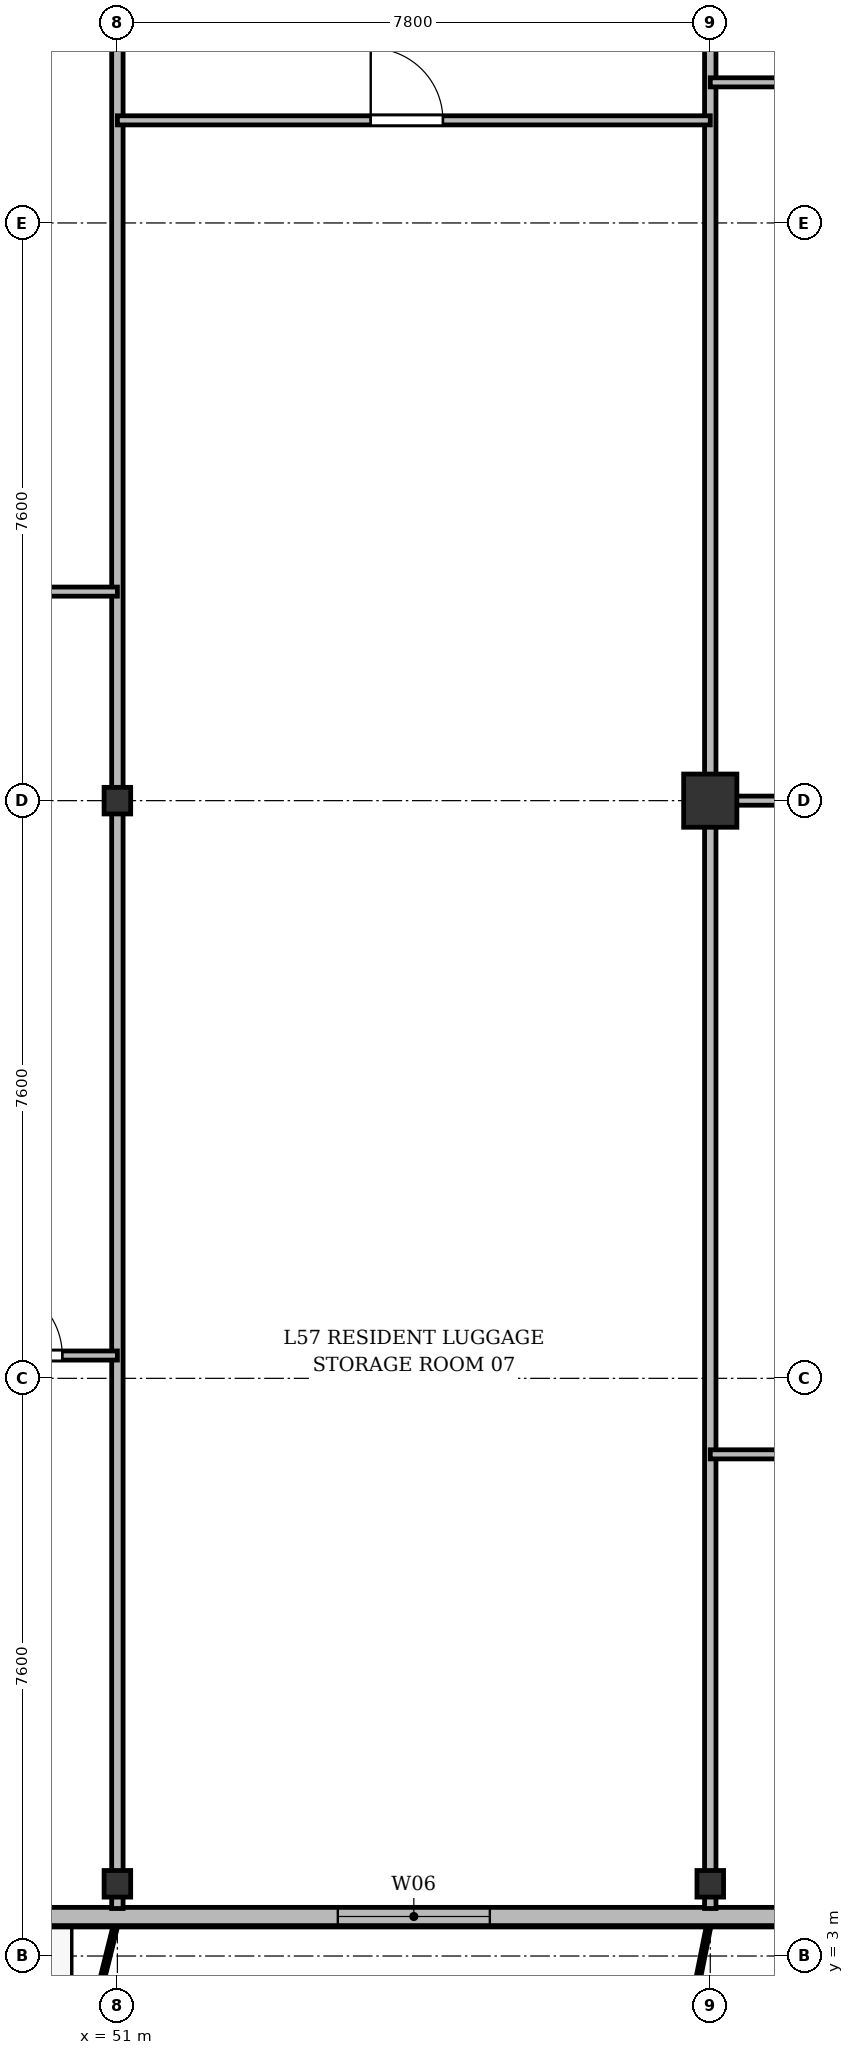
"""IFC4 building model, lengths in metres.
Left out: names, types, materials, properties, quantities, classifications, styles, units other than length and angle.
Written with IfcOpenShell. Run it as: python <this file> out.ifc"""

import sys

from ifc_helpers import new_model, si_unit, direction, frame, frame_2d, origin, origin_2d, place, context, subcontext, project, spatial, rectangle, i_section, extrude, source, transform, mapped, element, fill, save


model = new_model("IFC4")
c1 = context("Model", 3, precision=1e-05, world=origin(), true_north=direction((0.0, 1.0)))
c2 = subcontext(c1, "Body", "Model", "MODEL_VIEW")
j1 = project(units=[si_unit("LENGTHUNIT", "METRE"), si_unit("PLANEANGLEUNIT", "RADIAN")], contexts=[c1])
p1 = place(None, origin())
s1 = spatial("IfcSite", under=j1, at=p1, CompositionType="ELEMENT")
p2 = place(p1, origin())
s2 = spatial("IfcBuilding", under=s1, at=p2, CompositionType="ELEMENT")
p3 = place(p2, frame((0.0, 0.0, 219.3)))
s3 = spatial("IfcBuildingStorey", under=s2, at=p3, CompositionType="ELEMENT", Elevation=219.3)
m1 = source(origin(), c2, "Body", "SweptSolid", [
    extrude(i_section(OverallWidth=0.35, OverallDepth=0.35, WebThickness=0.018, FlangeThickness=0.028, at=origin_2d()), origin(), (0.0, 0.0, 1.0), 3.6),
])
for number, where, z_axis, x_axis in (
    (1, (51.0, 3.95, 0.0), (0.0, 0.0, 1.0), (1.0, 0.0, 0.0)),
    (2, (51.0, 18.2, 0.0), (0.0, 0.0, 1.0), (1.0, 0.0, 0.0)),
    (3, (58.8, 3.95, 0.0), (0.0, 0.0, 1.0), (1.0, 0.0, 0.0)),
):
    element("IfcColumn", number, at=place(p3, frame(where, z_axis=z_axis, x_axis=x_axis)), inside=s3, PredefinedType="COLUMN", context=c2, shape_type="MappedRepresentation", body=[
        mapped(m1, transform((0.0, 0.0, 0.0), x_axis=(1.0, 0.0, 0.0), y_axis=(0.0, 1.0, 0.0), z_axis=(0.0, 0.0, 1.0), scale=1.0)),
    ])
m2 = source(origin(), c2, "Body", "SweptSolid", [
    extrude(rectangle(XDim=0.7, YDim=0.7, at=origin_2d()), origin(), (0.0, 0.0, 1.0), 3.6),
])
p4 = place(p3, frame((58.8, 18.2, 0.0), z_axis=(0.0, 0.0, 1.0), x_axis=(1.0, 0.0, 0.0)))
e4 = element("IfcColumn", 4, at=p4, inside=s3, PredefinedType="COLUMN", context=c2, shape_type="MappedRepresentation", body=[
    mapped(m2, transform((0.0, 0.0, 0.0), x_axis=(1.0, 0.0, 0.0), y_axis=(0.0, 1.0, 0.0), z_axis=(0.0, 0.0, 1.0), scale=1.0)),
])
p5 = place(p3, frame((63.4, 3.52, 0.0), z_axis=(0.0, 0.0, 1.0), x_axis=(-1.0, 0.0, 0.0)))
e5 = element("IfcWall", 5, at=p5, inside=s3, PredefinedType="SOLIDWALL", context=c2, shape_type="SweptSolid", body=[
    extrude(rectangle(XDim=52.4, YDim=0.24, at=frame_2d((26.2, 0.0))), origin(), (0.0, 0.0, 1.0), 3.36),
])
p6 = place(p5, frame((1.595, 0.0, 0.9)))
e6 = element("IfcOpeningElement", 6, at=p6, cuts=e5, PredefinedType="OPENING", context=c2, shape_type="SweptSolid", body=[
    extrude(rectangle(XDim=1.5, YDim=1.75, at=frame_2d((0.75, 0.875))), frame((0.0, 0.13, 0.0), z_axis=(0.0, -1.0, 0.0), x_axis=(1.0, 0.0, 0.0)), (0.0, 0.0, 1.0), 0.26),
])
p7 = place(p5, frame((7.5, 0.0, 0.9)))
e7 = element("IfcOpeningElement", 7, at=p7, cuts=e5, PredefinedType="OPENING", context=c2, shape_type="SweptSolid", body=[
    extrude(rectangle(XDim=2.0, YDim=1.95, at=frame_2d((1.0, 0.975))), frame((0.0, 0.13, 0.0), z_axis=(0.0, -1.0, 0.0), x_axis=(1.0, 0.0, 0.0)), (0.0, 0.0, 1.0), 0.26),
])
p8 = place(p5, frame((13.42, 0.0, 0.0)))
e8 = element("IfcOpeningElement", 8, at=p8, cuts=e5, PredefinedType="OPENING", context=c2, shape_type="SweptSolid", body=[
    extrude(rectangle(XDim=1.2, YDim=2.2, at=frame_2d((0.6, 1.1))), frame((0.0, 0.13, 0.0), z_axis=(0.0, -1.0, 0.0), x_axis=(1.0, 0.0, 0.0)), (0.0, 0.0, 1.0), 0.26),
])
p9 = place(p5, frame((15.1, 0.0, 0.9)))
e9 = element("IfcOpeningElement", 9, at=p9, cuts=e5, PredefinedType="OPENING", context=c2, shape_type="SweptSolid", body=[
    extrude(rectangle(XDim=1.8, YDim=1.8, at=frame_2d((0.9, 0.9))), frame((0.0, 0.13, 0.0), z_axis=(0.0, -1.0, 0.0), x_axis=(1.0, 0.0, 0.0)), (0.0, 0.0, 1.0), 0.26),
])
p10 = place(p5, frame((17.65, 0.0, 0.9)))
e10 = element("IfcOpeningElement", 10, at=p10, cuts=e5, PredefinedType="OPENING", context=c2, shape_type="SweptSolid", body=[
    extrude(rectangle(XDim=1.5, YDim=1.75, at=frame_2d((0.75, 0.875))), frame((0.0, 0.13, 0.0), z_axis=(0.0, -1.0, 0.0), x_axis=(1.0, 0.0, 0.0)), (0.0, 0.0, 1.0), 0.26),
])
p11 = place(p5, frame((20.5, 0.0, 0.9)))
e11 = element("IfcOpeningElement", 11, at=p11, cuts=e5, PredefinedType="OPENING", context=c2, shape_type="SweptSolid", body=[
    extrude(rectangle(XDim=1.5, YDim=1.75, at=frame_2d((0.75, 0.875))), frame((0.0, 0.13, 0.0), z_axis=(0.0, -1.0, 0.0), x_axis=(1.0, 0.0, 0.0)), (0.0, 0.0, 1.0), 0.26),
])
p12 = place(p5, frame((23.55, 0.0, 0.9)))
e12 = element("IfcOpeningElement", 12, at=p12, cuts=e5, PredefinedType="OPENING", context=c2, shape_type="SweptSolid", body=[
    extrude(rectangle(XDim=2.0, YDim=1.95, at=frame_2d((1.0, 0.975))), frame((0.0, 0.13, 0.0), z_axis=(0.0, -1.0, 0.0), x_axis=(1.0, 0.0, 0.0)), (0.0, 0.0, 1.0), 0.26),
])
p13 = place(p5, frame((28.675, 0.0, 0.9)))
e13 = element("IfcOpeningElement", 13, at=p13, cuts=e5, PredefinedType="OPENING", context=c2, shape_type="SweptSolid", body=[
    extrude(rectangle(XDim=1.65, YDim=1.85, at=frame_2d((0.825, 0.925))), frame((0.0, 0.13, 0.0), z_axis=(0.0, -1.0, 0.0), x_axis=(1.0, 0.0, 0.0)), (0.0, 0.0, 1.0), 0.26),
])
p14 = place(p5, frame((33.7, 0.0, 0.9)))
e14 = element("IfcOpeningElement", 14, at=p14, cuts=e5, PredefinedType="OPENING", context=c2, shape_type="SweptSolid", body=[
    extrude(rectangle(XDim=1.8, YDim=1.8, at=frame_2d((0.9, 0.9))), frame((0.0, 0.13, 0.0), z_axis=(0.0, -1.0, 0.0), x_axis=(1.0, 0.0, 0.0)), (0.0, 0.0, 1.0), 0.26),
])
p15 = place(p5, frame((37.1, 0.0, 0.9)))
e15 = element("IfcOpeningElement", 15, at=p15, cuts=e5, PredefinedType="OPENING", context=c2, shape_type="SweptSolid", body=[
    extrude(rectangle(XDim=2.2, YDim=1.8, at=frame_2d((1.1, 0.9))), frame((0.0, 0.13, 0.0), z_axis=(0.0, -1.0, 0.0), x_axis=(1.0, 0.0, 0.0)), (0.0, 0.0, 1.0), 0.26),
])
p16 = place(p5, frame((41.09, 0.0, 0.0)))
e16 = element("IfcOpeningElement", 16, at=p16, cuts=e5, PredefinedType="OPENING", context=c2, shape_type="SweptSolid", body=[
    extrude(rectangle(XDim=1.2, YDim=2.2, at=frame_2d((0.6, 1.1))), frame((0.0, 0.13, 0.0), z_axis=(0.0, -1.0, 0.0), x_axis=(1.0, 0.0, 0.0)), (0.0, 0.0, 1.0), 0.26),
])
p17 = place(p5, frame((42.9, 0.0, 0.9)))
e17 = element("IfcOpeningElement", 17, at=p17, cuts=e5, PredefinedType="OPENING", context=c2, shape_type="SweptSolid", body=[
    extrude(rectangle(XDim=2.0, YDim=1.95, at=frame_2d((1.0, 0.975))), frame((0.0, 0.13, 0.0), z_axis=(0.0, -1.0, 0.0), x_axis=(1.0, 0.0, 0.0)), (0.0, 0.0, 1.0), 0.26),
])
p18 = place(p5, frame((45.675, 0.0, 0.9)))
e18 = element("IfcOpeningElement", 18, at=p18, cuts=e5, PredefinedType="OPENING", context=c2, shape_type="SweptSolid", body=[
    extrude(rectangle(XDim=1.65, YDim=1.85, at=frame_2d((0.825, 0.925))), frame((0.0, 0.13, 0.0), z_axis=(0.0, -1.0, 0.0), x_axis=(1.0, 0.0, 0.0)), (0.0, 0.0, 1.0), 0.26),
])
p19 = place(p5, frame((49.155, 0.0, 0.9)))
e19 = element("IfcOpeningElement", 19, at=p19, cuts=e5, PredefinedType="OPENING", context=c2, shape_type="SweptSolid", body=[
    extrude(rectangle(XDim=1.8, YDim=1.8, at=frame_2d((0.9, 0.9))), frame((0.0, 0.13, 0.0), z_axis=(0.0, -1.0, 0.0), x_axis=(1.0, 0.0, 0.0)), (0.0, 0.0, 1.0), 0.26),
])
for number, where, z_axis, x_axis in (
    (20, (51.0, 3.625, 0.0), (0.0, 0.0, 1.0), (0.0, 1.0, 0.0)),
    (21, (58.8, 3.625, 0.0), (0.0, 0.0, 1.0), (0.0, 1.0, 0.0)),
):
    element("IfcWall", number, at=place(p3, frame(where, z_axis=z_axis, x_axis=x_axis)), inside=s3, PredefinedType="PARTITIONING", context=c2, shape_type="SweptSolid", body=[
        extrude(rectangle(XDim=27.375, YDim=0.15, at=frame_2d((13.688, 0.0))), origin(), (0.0, 0.0, 1.0), 2.86),
    ])
p20 = place(p3, frame((43.8, 20.95, 0.0), z_axis=(0.0, 0.0, 1.0), x_axis=(1.0, 0.0, 0.0)))
e22 = element("IfcWall", 22, at=p20, inside=s3, PredefinedType="PARTITIONING", context=c2, shape_type="SweptSolid", body=[
    extrude(rectangle(XDim=7.2, YDim=0.12, at=frame_2d((3.6, 0.0))), origin(), (0.0, 0.0, 1.0), 2.86),
])
p21 = place(p20, frame((3.125, 0.0, 0.0)))
e23 = element("IfcOpeningElement", 23, at=p21, cuts=e22, PredefinedType="OPENING", context=c2, shape_type="SweptSolid", body=[
    extrude(rectangle(XDim=0.95, YDim=2.15, at=frame_2d((0.475, 1.075))), frame((0.0, 0.07, 0.0), z_axis=(0.0, -1.0, 0.0), x_axis=(1.0, 0.0, 0.0)), (0.0, 0.0, 1.0), 0.14),
])
p22 = place(p3, frame((48.6, 10.9, 0.0), z_axis=(0.0, 0.0, 1.0), x_axis=(1.0, 0.0, 0.0)))
e24 = element("IfcWall", 24, at=p22, inside=s3, PredefinedType="PARTITIONING", context=c2, shape_type="SweptSolid", body=[
    extrude(rectangle(XDim=2.4, YDim=0.12, at=frame_2d((1.2, 0.0))), origin(), (0.0, 0.0, 1.0), 2.86),
])
p23 = place(p22, frame((0.725, 0.0, 0.0)))
e25 = element("IfcOpeningElement", 25, at=p23, cuts=e24, PredefinedType="OPENING", context=c2, shape_type="SweptSolid", body=[
    extrude(rectangle(XDim=0.95, YDim=2.15, at=frame_2d((0.475, 1.075))), frame((0.0, 0.07, 0.0), z_axis=(0.0, -1.0, 0.0), x_axis=(1.0, 0.0, 0.0)), (0.0, 0.0, 1.0), 0.14),
])
p24 = place(p3, frame((51.0, 27.15, 0.0), z_axis=(0.0, 0.0, 1.0), x_axis=(1.0, 0.0, 0.0)))
e26 = element("IfcWall", 26, at=p24, inside=s3, PredefinedType="PARTITIONING", context=c2, shape_type="SweptSolid", body=[
    extrude(rectangle(XDim=7.8, YDim=0.12, at=frame_2d((3.9, 0.0))), origin(), (0.0, 0.0, 1.0), 2.86),
])
p25 = place(p24, frame((3.333, 0.0, 0.0)))
e27 = element("IfcOpeningElement", 27, at=p25, cuts=e26, PredefinedType="OPENING", context=c2, shape_type="SweptSolid", body=[
    extrude(rectangle(XDim=0.95, YDim=2.15, at=frame_2d((0.475, 1.075))), frame((0.0, 0.07, 0.0), z_axis=(0.0, -1.0, 0.0), x_axis=(1.0, 0.0, 0.0)), (0.0, 0.0, 1.0), 0.14),
])
p26 = place(p3, frame((58.8, 18.2, 0.0), z_axis=(0.0, 0.0, 1.0), x_axis=(1.0, 0.0, 0.0)))
e28 = element("IfcWall", 28, at=p26, inside=s3, PredefinedType="PARTITIONING", context=c2, shape_type="SweptSolid", body=[
    extrude(rectangle(XDim=7.36, YDim=0.12, at=frame_2d((3.68, 0.0))), origin(), (0.0, 0.0, 1.0), 2.91),
])
p27 = place(p26, frame((3.114, 0.0, 0.0)))
e29 = element("IfcOpeningElement", 29, at=p27, cuts=e28, PredefinedType="OPENING", context=c2, shape_type="SweptSolid", body=[
    extrude(rectangle(XDim=0.95, YDim=2.15, at=frame_2d((0.475, 1.075))), frame((0.0, 0.07, 0.0), z_axis=(0.0, -1.0, 0.0), x_axis=(1.0, 0.0, 0.0)), (0.0, 0.0, 1.0), 0.14),
])
p28 = place(p3, frame((58.8, 27.65, 0.0), z_axis=(0.0, 0.0, 1.0), x_axis=(1.0, 0.0, 0.0)))
e30 = element("IfcWall", 30, at=p28, inside=s3, PredefinedType="PARTITIONING", context=c2, shape_type="SweptSolid", body=[
    extrude(rectangle(XDim=2.4, YDim=0.12, at=frame_2d((1.2, 0.0))), origin(), (0.0, 0.0, 1.0), 2.86),
])
p29 = place(p3, frame((58.8, 9.6, 0.0), z_axis=(0.0, 0.0, 1.0), x_axis=(1.0, 0.0, 0.0)))
e31 = element("IfcWall", 31, at=p29, inside=s3, PredefinedType="PARTITIONING", context=c2, shape_type="SweptSolid", body=[
    extrude(rectangle(XDim=7.36, YDim=0.12, at=frame_2d((3.68, 0.0))), origin(), (0.0, 0.0, 1.0), 2.86),
])
p30 = place(p29, frame((3.114, 0.0, 0.0)))
e32 = element("IfcOpeningElement", 32, at=p30, cuts=e31, PredefinedType="OPENING", context=c2, shape_type="SweptSolid", body=[
    extrude(rectangle(XDim=0.95, YDim=2.15, at=frame_2d((0.475, 1.075))), frame((0.0, 0.07, 0.0), z_axis=(0.0, -1.0, 0.0), x_axis=(1.0, 0.0, 0.0)), (0.0, 0.0, 1.0), 0.14),
])
m3 = source(origin(), c2, "Body", "SweptSolid", [
    extrude(rectangle(XDim=2.0, YDim=1.95, at=frame_2d((1.0, 0.975))), frame((0.0, 0.03, 0.0), z_axis=(0.0, -1.0, 0.0), x_axis=(1.0, 0.0, 0.0)), (0.0, 0.0, 1.0), 0.06),
])
p31 = place(p7, origin())
e33 = element("IfcWindow", 33, at=p31, inside=s3, PartitioningType="SINGLE_PANEL", PredefinedType="WINDOW", context=c2, shape_type="MappedRepresentation", body=[
    mapped(m3, transform((0.0, 0.0, 0.0), x_axis=(1.0, 0.0, 0.0), y_axis=(0.0, 1.0, 0.0), z_axis=(0.0, 0.0, 1.0), scale=1.0)),
])
fill(e7, e33)
m4 = source(origin(), c2, "Body", "SweptSolid", [
    extrude(rectangle(XDim=0.95, YDim=2.15, at=frame_2d((0.475, 1.075))), frame((0.0, 0.025, 0.0), z_axis=(0.0, -1.0, 0.0), x_axis=(1.0, 0.0, 0.0)), (0.0, 0.0, 1.0), 0.05),
])
p32 = place(p23, origin())
e34 = element("IfcDoor", 34, at=p32, inside=s3, OperationType="SINGLE_SWING_LEFT", PredefinedType="DOOR", context=c2, shape_type="MappedRepresentation", body=[
    mapped(m4, transform((0.0, 0.0, 0.0), x_axis=(1.0, 0.0, 0.0), y_axis=(0.0, 1.0, 0.0), z_axis=(0.0, 0.0, 1.0), scale=1.0)),
])
fill(e25, e34)
p33 = place(p25, origin())
e35 = element("IfcDoor", 35, at=p33, inside=s3, OperationType="SINGLE_SWING_LEFT", PredefinedType="DOOR", context=c2, shape_type="MappedRepresentation", body=[
    mapped(m4, transform((0.0, 0.0, 0.0), x_axis=(1.0, 0.0, 0.0), y_axis=(0.0, 1.0, 0.0), z_axis=(0.0, 0.0, 1.0), scale=1.0)),
])
fill(e27, e35)
save(model, sys.argv[1])
